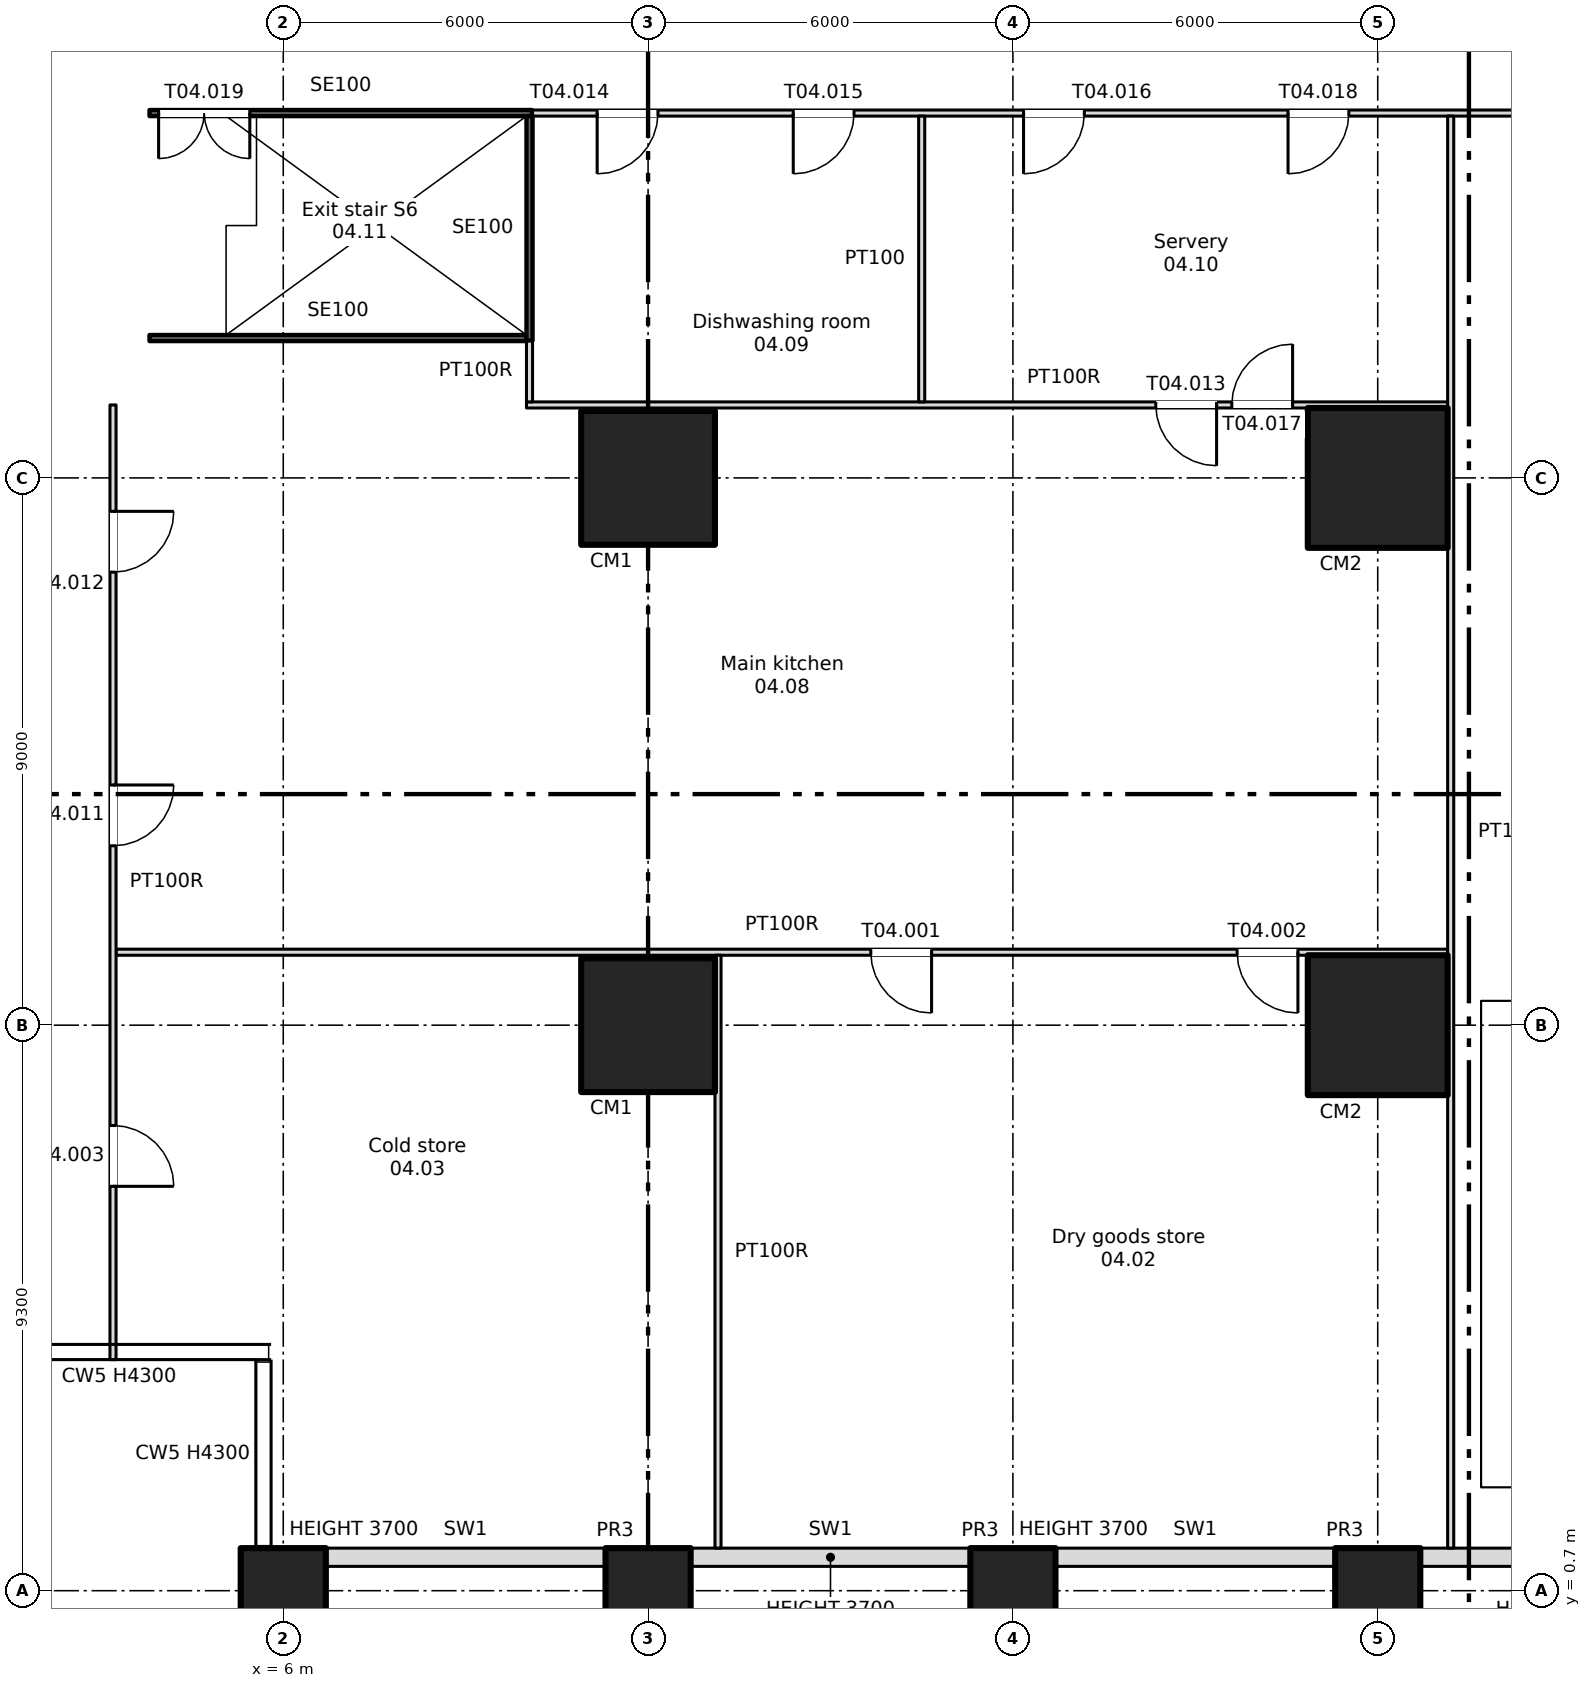
"""IFC4 building model, lengths in metres.
Left out: names, types, materials, properties, quantities, classifications, styles, units other than length and angle.
Written with IfcOpenShell. Run it as: python <this file> out.ifc"""

import sys

from ifc_helpers import new_model, si_unit, direction, frame, frame_2d, origin, origin_2d, place, context, subcontext, project, spatial, rectangle, extrude, element, fill, save


model = new_model("IFC4")
c1 = context("Model", 3, precision=1e-05, world=origin(), true_north=direction((0.0, 1.0)))
c2 = subcontext(c1, "Body", "Model", "MODEL_VIEW")
j1 = project(units=[si_unit("LENGTHUNIT", "METRE"), si_unit("PLANEANGLEUNIT", "RADIAN")], contexts=[c1])
p1 = place(None, origin())
s1 = spatial("IfcSite", under=j1, at=p1, CompositionType="ELEMENT")
p2 = place(p1, origin())
s2 = spatial("IfcBuilding", under=s1, at=p2, CompositionType="ELEMENT")
p3 = place(p2, frame((0.0, 0.0, 6.5)))
s3 = spatial("IfcBuildingStorey", under=s2, at=p3, CompositionType="ELEMENT", Elevation=6.5)
for number, where, z_axis, x_axis in (
    (1, (6.0, 0.7, -1.1), (0.0, 0.0, 1.0), (1.0, 0.0, 0.0)),
    (2, (12.0, 0.7, -1.1), (0.0, 0.0, 1.0), (1.0, 0.0, 0.0)),
    (3, (18.0, 0.7, -1.1), (0.0, 0.0, 1.0), (1.0, 0.0, 0.0)),
    (4, (24.0, 0.7, -1.1), (0.0, 0.0, 1.0), (1.0, 0.0, 0.0)),
):
    element("IfcColumn", number, at=place(p3, frame(where, z_axis=z_axis, x_axis=x_axis)), inside=s3, PredefinedType="COLUMN", context=c2, shape_type="SweptSolid", body=[
        extrude(rectangle(XDim=1.4, YDim=1.4, at=origin_2d()), origin(), (0.0, 0.0, 1.0), 5.4),
    ])
for number, where, z_axis, x_axis in (
    (5, (12.0, 10.0, 0.0), (0.0, 0.0, 1.0), (1.0, 0.0, 0.0)),
    (6, (12.0, 19.0, 0.0), (0.0, 0.0, 1.0), (1.0, 0.0, 0.0)),
):
    element("IfcColumn", number, at=place(p3, frame(where, z_axis=z_axis, x_axis=x_axis)), inside=s3, PredefinedType="COLUMN", context=c2, shape_type="SweptSolid", body=[
        extrude(rectangle(XDim=2.2, YDim=2.2, at=origin_2d()), origin(), (0.0, 0.0, 1.0), 4.3),
    ])
for number, where, z_axis, x_axis in (
    (7, (24.0, 10.0, 0.0), (0.0, 0.0, 1.0), (1.0, 0.0, 0.0)),
    (8, (24.0, 19.0, 0.0), (0.0, 0.0, 1.0), (1.0, 0.0, 0.0)),
):
    element("IfcColumn", number, at=place(p3, frame(where, z_axis=z_axis, x_axis=x_axis)), inside=s3, PredefinedType="COLUMN", context=c2, shape_type="SweptSolid", body=[
        extrude(rectangle(XDim=2.3, YDim=2.3, at=origin_2d()), origin(), (0.0, 0.0, 1.0), 4.3),
    ])
for number, where, z_axis, x_axis in (
    (9, (6.7, 1.25, 0.0), (0.0, 0.0, 1.0), (1.0, 0.0, 0.0)),
    (10, (12.7, 1.25, 0.0), (0.0, 0.0, 1.0), (1.0, 0.0, 0.0)),
    (11, (18.7, 1.25, 0.0), (0.0, 0.0, 1.0), (1.0, 0.0, 0.0)),
):
    element("IfcWall", number, at=place(p3, frame(where, z_axis=z_axis, x_axis=x_axis)), inside=s3, PredefinedType="SOLIDWALL", context=c2, shape_type="SweptSolid", body=[
        extrude(rectangle(XDim=4.6, YDim=0.3, at=frame_2d((2.3, 0.0))), origin(), (0.0, 0.0, 1.0), 3.7),
    ])
p4 = place(p3, frame((24.7, 1.25, 0.0), z_axis=(0.0, 0.0, 1.0), x_axis=(1.0, 0.0, 0.0)))
e12 = element("IfcWall", 12, at=p4, inside=s3, PredefinedType="SOLIDWALL", context=c2, shape_type="SweptSolid", body=[
    extrude(rectangle(XDim=4.6, YDim=0.3, at=frame_2d((2.3, 0.0))), origin(), (0.0, 0.0, 1.0), 3.7),
])
p5 = place(p4, frame((1.55, 0.0, 0.9)))
e13 = element("IfcOpeningElement", 13, at=p5, cuts=e12, PredefinedType="OPENING", context=c2, shape_type="SweptSolid", body=[
    extrude(rectangle(XDim=1.5, YDim=2.4, at=frame_2d((0.75, 1.2))), frame((0.0, 0.16, 0.0), z_axis=(0.0, -1.0, 0.0), x_axis=(1.0, 0.0, 0.0)), (0.0, 0.0, 1.0), 0.32),
])
p6 = place(p3, frame((3.25, 11.2, 0.0), z_axis=(0.0, 0.0, 1.0), x_axis=(1.0, 0.0, 0.0)))
e14 = element("IfcWall", 14, at=p6, inside=s3, PredefinedType="PARTITIONING", context=c2, shape_type="SweptSolid", body=[
    extrude(rectangle(XDim=21.9, YDim=0.1, at=frame_2d((10.95, 0.0))), origin(), (0.0, 0.0, 1.0), 4.3),
])
p7 = place(p6, frame((12.413, 0.0, 0.0)))
e15 = element("IfcOpeningElement", 15, at=p7, cuts=e14, PredefinedType="OPENING", context=c2, shape_type="SweptSolid", body=[
    extrude(rectangle(XDim=1.0, YDim=2.1, at=frame_2d((0.5, 1.05))), frame((0.0, 0.06, 0.0), z_axis=(0.0, -1.0, 0.0), x_axis=(1.0, 0.0, 0.0)), (0.0, 0.0, 1.0), 0.12),
])
p8 = place(p6, frame((18.438, 0.0, 0.0)))
e16 = element("IfcOpeningElement", 16, at=p8, cuts=e14, PredefinedType="OPENING", context=c2, shape_type="SweptSolid", body=[
    extrude(rectangle(XDim=1.0, YDim=2.1, at=frame_2d((0.5, 1.05))), frame((0.0, 0.06, 0.0), z_axis=(0.0, -1.0, 0.0), x_axis=(1.0, 0.0, 0.0)), (0.0, 0.0, 1.0), 0.12),
])
p9 = place(p3, frame((10.0, 20.2, 0.0), z_axis=(0.0, 0.0, 1.0), x_axis=(1.0, 0.0, 0.0)))
e17 = element("IfcWall", 17, at=p9, inside=s3, PredefinedType="PARTITIONING", context=c2, shape_type="SweptSolid", body=[
    extrude(rectangle(XDim=15.15, YDim=0.1, at=frame_2d((7.575, 0.0))), origin(), (0.0, 0.0, 1.0), 4.3),
])
p10 = place(p9, frame((10.35, 0.0, 0.0)))
e18 = element("IfcOpeningElement", 18, at=p10, cuts=e17, PredefinedType="OPENING", context=c2, shape_type="SweptSolid", body=[
    extrude(rectangle(XDim=1.0, YDim=2.1, at=frame_2d((0.5, 1.05))), frame((0.0, 0.06, 0.0), z_axis=(0.0, -1.0, 0.0), x_axis=(1.0, 0.0, 0.0)), (0.0, 0.0, 1.0), 0.12),
])
p11 = place(p9, frame((11.6, 0.0, 0.0)))
e19 = element("IfcOpeningElement", 19, at=p11, cuts=e17, PredefinedType="OPENING", context=c2, shape_type="SweptSolid", body=[
    extrude(rectangle(XDim=1.0, YDim=2.1, at=frame_2d((0.5, 1.05))), frame((0.0, 0.06, 0.0), z_axis=(0.0, -1.0, 0.0), x_axis=(1.0, 0.0, 0.0)), (0.0, 0.0, 1.0), 0.12),
])
p12 = place(p3, frame((3.8, 21.3, 0.0), z_axis=(0.0, 0.0, 1.0), x_axis=(1.0, 0.0, 0.0)))
e20 = element("IfcWall", 20, at=p12, inside=s3, PredefinedType="SOLIDWALL", context=c2, shape_type="SweptSolid", body=[
    extrude(rectangle(XDim=6.2, YDim=0.1, at=frame_2d((3.1, 0.0))), origin(), (0.0, 0.0, 1.0), 4.3),
])
p13 = place(p3, frame((3.8, 25.0, 0.0), z_axis=(0.0, 0.0, 1.0), x_axis=(1.0, 0.0, 0.0)))
e21 = element("IfcWall", 21, at=p13, inside=s3, PredefinedType="SOLIDWALL", context=c2, shape_type="SweptSolid", body=[
    extrude(rectangle(XDim=6.29, YDim=0.1, at=frame_2d((3.145, 0.0))), origin(), (0.0, 0.0, 1.0), 4.3),
])
p14 = place(p13, frame((0.15, 0.0, 0.0)))
e22 = element("IfcOpeningElement", 22, at=p14, cuts=e21, PredefinedType="OPENING", context=c2, shape_type="SweptSolid", body=[
    extrude(rectangle(XDim=1.5, YDim=2.1, at=frame_2d((0.75, 1.05))), frame((0.0, 0.06, 0.0), z_axis=(0.0, -1.0, 0.0), x_axis=(1.0, 0.0, 0.0)), (0.0, 0.0, 1.0), 0.12),
])
p15 = place(p3, frame((10.09, 25.0, 0.0), z_axis=(0.0, 0.0, 1.0), x_axis=(1.0, 0.0, 0.0)))
e23 = element("IfcWall", 23, at=p15, inside=s3, PredefinedType="PARTITIONING", context=c2, shape_type="SweptSolid", body=[
    extrude(rectangle(XDim=51.02, YDim=0.1, at=frame_2d((25.51, 0.0))), origin(), (0.0, 0.0, 1.0), 4.3),
])
p16 = place(p15, frame((20.51, 0.0, 0.0)))
e24 = element("IfcOpeningElement", 24, at=p16, cuts=e23, PredefinedType="OPENING", context=c2, shape_type="SweptSolid", body=[
    extrude(rectangle(XDim=1.2, YDim=2.1, at=frame_2d((0.6, 1.05))), frame((0.0, 0.06, 0.0), z_axis=(0.0, -1.0, 0.0), x_axis=(1.0, 0.0, 0.0)), (0.0, 0.0, 1.0), 0.12),
])
p17 = place(p15, frame((32.51, 0.0, 0.0)))
e25 = element("IfcOpeningElement", 25, at=p17, cuts=e23, PredefinedType="OPENING", context=c2, shape_type="SweptSolid", body=[
    extrude(rectangle(XDim=1.2, YDim=2.1, at=frame_2d((0.6, 1.05))), frame((0.0, 0.06, 0.0), z_axis=(0.0, -1.0, 0.0), x_axis=(1.0, 0.0, 0.0)), (0.0, 0.0, 1.0), 0.12),
])
p18 = place(p15, frame((41.498, 0.0, 0.0)))
e26 = element("IfcOpeningElement", 26, at=p18, cuts=e23, PredefinedType="OPENING", context=c2, shape_type="SweptSolid", body=[
    extrude(rectangle(XDim=1.2, YDim=2.1, at=frame_2d((0.6, 1.05))), frame((0.0, 0.06, 0.0), z_axis=(0.0, -1.0, 0.0), x_axis=(1.0, 0.0, 0.0)), (0.0, 0.0, 1.0), 0.12),
])
p19 = place(p15, frame((47.472, 0.0, 0.0)))
e27 = element("IfcOpeningElement", 27, at=p19, cuts=e23, PredefinedType="OPENING", context=c2, shape_type="SweptSolid", body=[
    extrude(rectangle(XDim=1.2, YDim=2.1, at=frame_2d((0.6, 1.05))), frame((0.0, 0.06, 0.0), z_axis=(0.0, -1.0, 0.0), x_axis=(1.0, 0.0, 0.0)), (0.0, 0.0, 1.0), 0.12),
])
p20 = place(p15, frame((1.073, 0.0, 0.0)))
e28 = element("IfcOpeningElement", 28, at=p20, cuts=e23, PredefinedType="OPENING", context=c2, shape_type="SweptSolid", body=[
    extrude(rectangle(XDim=1.0, YDim=2.1, at=frame_2d((0.5, 1.05))), frame((0.0, 0.06, 0.0), z_axis=(0.0, -1.0, 0.0), x_axis=(1.0, 0.0, 0.0)), (0.0, 0.0, 1.0), 0.12),
])
p21 = place(p15, frame((4.298, 0.0, 0.0)))
e29 = element("IfcOpeningElement", 29, at=p21, cuts=e23, PredefinedType="OPENING", context=c2, shape_type="SweptSolid", body=[
    extrude(rectangle(XDim=1.0, YDim=2.1, at=frame_2d((0.5, 1.05))), frame((0.0, 0.06, 0.0), z_axis=(0.0, -1.0, 0.0), x_axis=(1.0, 0.0, 0.0)), (0.0, 0.0, 1.0), 0.12),
])
p22 = place(p15, frame((8.085, 0.0, 0.0)))
e30 = element("IfcOpeningElement", 30, at=p22, cuts=e23, PredefinedType="OPENING", context=c2, shape_type="SweptSolid", body=[
    extrude(rectangle(XDim=1.0, YDim=2.1, at=frame_2d((0.5, 1.05))), frame((0.0, 0.06, 0.0), z_axis=(0.0, -1.0, 0.0), x_axis=(1.0, 0.0, 0.0)), (0.0, 0.0, 1.0), 0.12),
])
p23 = place(p15, frame((12.435, 0.0, 0.0)))
e31 = element("IfcOpeningElement", 31, at=p23, cuts=e23, PredefinedType="OPENING", context=c2, shape_type="SweptSolid", body=[
    extrude(rectangle(XDim=1.0, YDim=2.1, at=frame_2d((0.5, 1.05))), frame((0.0, 0.06, 0.0), z_axis=(0.0, -1.0, 0.0), x_axis=(1.0, 0.0, 0.0)), (0.0, 0.0, 1.0), 0.12),
])
p24 = place(p3, frame((3.2, 4.5, 0.0), z_axis=(0.0, 0.0, 1.0), x_axis=(0.0, 1.0, 0.0)))
e32 = element("IfcWall", 32, at=p24, inside=s3, PredefinedType="PARTITIONING", context=c2, shape_type="SweptSolid", body=[
    extrude(rectangle(XDim=15.7, YDim=0.1, at=frame_2d((7.85, 0.0))), origin(), (0.0, 0.0, 1.0), 4.3),
])
p25 = place(p24, frame((2.85, 0.0, 0.0)))
e33 = element("IfcOpeningElement", 33, at=p25, cuts=e32, PredefinedType="OPENING", context=c2, shape_type="SweptSolid", body=[
    extrude(rectangle(XDim=1.0, YDim=2.1, at=frame_2d((0.5, 1.05))), frame((0.0, 0.06, 0.0), z_axis=(0.0, -1.0, 0.0), x_axis=(1.0, 0.0, 0.0)), (0.0, 0.0, 1.0), 0.12),
])
p26 = place(p24, frame((8.45, 0.0, 0.0)))
e34 = element("IfcOpeningElement", 34, at=p26, cuts=e32, PredefinedType="OPENING", context=c2, shape_type="SweptSolid", body=[
    extrude(rectangle(XDim=1.0, YDim=2.1, at=frame_2d((0.5, 1.05))), frame((0.0, 0.06, 0.0), z_axis=(0.0, -1.0, 0.0), x_axis=(1.0, 0.0, 0.0)), (0.0, 0.0, 1.0), 0.12),
])
p27 = place(p24, frame((12.95, 0.0, 0.0)))
e35 = element("IfcOpeningElement", 35, at=p27, cuts=e32, PredefinedType="OPENING", context=c2, shape_type="SweptSolid", body=[
    extrude(rectangle(XDim=1.0, YDim=2.1, at=frame_2d((0.5, 1.05))), frame((0.0, 0.06, 0.0), z_axis=(0.0, -1.0, 0.0), x_axis=(1.0, 0.0, 0.0)), (0.0, 0.0, 1.0), 0.12),
])
p28 = place(p3, frame((10.05, 20.25, 0.0), z_axis=(0.0, 0.0, 1.0), x_axis=(0.0, 1.0, 0.0)))
e36 = element("IfcWall", 36, at=p28, inside=s3, PredefinedType="PARTITIONING", context=c2, shape_type="SweptSolid", body=[
    extrude(rectangle(XDim=1.01, YDim=0.1, at=frame_2d((0.505, 0.0))), origin(), (0.0, 0.0, 1.0), 4.3),
])
p29 = place(p3, frame((10.05, 21.26, 0.0), z_axis=(0.0, 0.0, 1.0), x_axis=(0.0, 1.0, 0.0)))
e37 = element("IfcWall", 37, at=p29, inside=s3, PredefinedType="SOLIDWALL", context=c2, shape_type="SweptSolid", body=[
    extrude(rectangle(XDim=3.69, YDim=0.1, at=frame_2d((1.845, 0.0))), origin(), (0.0, 0.0, 1.0), 4.3),
])
p30 = place(p3, frame((13.15, 1.4, 0.0), z_axis=(0.0, 0.0, 1.0), x_axis=(0.0, 1.0, 0.0)))
e38 = element("IfcWall", 38, at=p30, inside=s3, PredefinedType="PARTITIONING", context=c2, shape_type="SweptSolid", body=[
    extrude(rectangle(XDim=9.75, YDim=0.1, at=frame_2d((4.875, 0.0))), origin(), (0.0, 0.0, 1.0), 4.3),
])
p31 = place(p3, frame((16.5, 20.25, 0.0), z_axis=(0.0, 0.0, 1.0), x_axis=(0.0, 1.0, 0.0)))
e39 = element("IfcWall", 39, at=p31, inside=s3, PredefinedType="PARTITIONING", context=c2, shape_type="SweptSolid", body=[
    extrude(rectangle(XDim=4.7, YDim=0.1, at=frame_2d((2.35, 0.0))), origin(), (0.0, 0.0, 1.0), 4.3),
])
p32 = place(p3, frame((25.2, 1.4, 0.0), z_axis=(0.0, 0.0, 1.0), x_axis=(0.0, 1.0, 0.0)))
e40 = element("IfcWall", 40, at=p32, inside=s3, PredefinedType="PARTITIONING", context=c2, shape_type="SweptSolid", body=[
    extrude(rectangle(XDim=23.55, YDim=0.1, at=frame_2d((11.775, 0.0))), origin(), (0.0, 0.0, 1.0), 4.3),
])
p33 = place(p7, origin())
e41 = element("IfcDoor", 41, at=p33, inside=s3, OperationType="SINGLE_SWING_RIGHT", PredefinedType="DOOR", context=c2, shape_type="SweptSolid", body=[
    extrude(rectangle(XDim=1.0, YDim=2.1, at=frame_2d((0.5, 1.05))), frame((0.0, 0.025, 0.0), z_axis=(0.0, -1.0, 0.0), x_axis=(1.0, 0.0, 0.0)), (0.0, 0.0, 1.0), 0.05),
])
fill(e15, e41)
p34 = place(p8, origin())
e42 = element("IfcDoor", 42, at=p34, inside=s3, OperationType="SINGLE_SWING_RIGHT", PredefinedType="DOOR", context=c2, shape_type="SweptSolid", body=[
    extrude(rectangle(XDim=1.0, YDim=2.1, at=frame_2d((0.5, 1.05))), frame((0.0, 0.025, 0.0), z_axis=(0.0, -1.0, 0.0), x_axis=(1.0, 0.0, 0.0)), (0.0, 0.0, 1.0), 0.05),
])
fill(e16, e42)
p35 = place(p25, origin())
e43 = element("IfcDoor", 43, at=p35, inside=s3, OperationType="SINGLE_SWING_LEFT", PredefinedType="DOOR", context=c2, shape_type="SweptSolid", body=[
    extrude(rectangle(XDim=1.0, YDim=2.1, at=frame_2d((0.5, 1.05))), frame((0.0, 0.025, 0.0), z_axis=(0.0, -1.0, 0.0), x_axis=(1.0, 0.0, 0.0)), (0.0, 0.0, 1.0), 0.05),
])
fill(e33, e43)
p36 = place(p26, origin())
e44 = element("IfcDoor", 44, at=p36, inside=s3, OperationType="SINGLE_SWING_RIGHT", PredefinedType="DOOR", context=c2, shape_type="SweptSolid", body=[
    extrude(rectangle(XDim=1.0, YDim=2.1, at=frame_2d((0.5, 1.05))), frame((0.0, 0.025, 0.0), z_axis=(0.0, -1.0, 0.0), x_axis=(1.0, 0.0, 0.0)), (0.0, 0.0, 1.0), 0.05),
])
fill(e34, e44)
p37 = place(p27, origin())
e45 = element("IfcDoor", 45, at=p37, inside=s3, OperationType="SINGLE_SWING_RIGHT", PredefinedType="DOOR", context=c2, shape_type="SweptSolid", body=[
    extrude(rectangle(XDim=1.0, YDim=2.1, at=frame_2d((0.5, 1.05))), frame((0.0, 0.025, 0.0), z_axis=(0.0, -1.0, 0.0), x_axis=(1.0, 0.0, 0.0)), (0.0, 0.0, 1.0), 0.05),
])
fill(e35, e45)
p38 = place(p10, origin())
e46 = element("IfcDoor", 46, at=p38, inside=s3, OperationType="SINGLE_SWING_RIGHT", PredefinedType="DOOR", context=c2, shape_type="SweptSolid", body=[
    extrude(rectangle(XDim=1.0, YDim=2.1, at=frame_2d((0.5, 1.05))), frame((0.0, 0.025, 0.0), z_axis=(0.0, -1.0, 0.0), x_axis=(1.0, 0.0, 0.0)), (0.0, 0.0, 1.0), 0.05),
])
fill(e18, e46)
p39 = place(p20, origin())
e47 = element("IfcDoor", 47, at=p39, inside=s3, OperationType="SINGLE_SWING_LEFT", PredefinedType="DOOR", context=c2, shape_type="SweptSolid", body=[
    extrude(rectangle(XDim=1.0, YDim=2.1, at=frame_2d((0.5, 1.05))), frame((0.0, 0.025, 0.0), z_axis=(0.0, -1.0, 0.0), x_axis=(1.0, 0.0, 0.0)), (0.0, 0.0, 1.0), 0.05),
])
fill(e28, e47)
p40 = place(p21, origin())
e48 = element("IfcDoor", 48, at=p40, inside=s3, OperationType="SINGLE_SWING_LEFT", PredefinedType="DOOR", context=c2, shape_type="SweptSolid", body=[
    extrude(rectangle(XDim=1.0, YDim=2.1, at=frame_2d((0.5, 1.05))), frame((0.0, 0.025, 0.0), z_axis=(0.0, -1.0, 0.0), x_axis=(1.0, 0.0, 0.0)), (0.0, 0.0, 1.0), 0.05),
])
fill(e29, e48)
p41 = place(p22, origin())
e49 = element("IfcDoor", 49, at=p41, inside=s3, OperationType="SINGLE_SWING_LEFT", PredefinedType="DOOR", context=c2, shape_type="SweptSolid", body=[
    extrude(rectangle(XDim=1.0, YDim=2.1, at=frame_2d((0.5, 1.05))), frame((0.0, 0.025, 0.0), z_axis=(0.0, -1.0, 0.0), x_axis=(1.0, 0.0, 0.0)), (0.0, 0.0, 1.0), 0.05),
])
fill(e30, e49)
p42 = place(p11, origin())
e50 = element("IfcDoor", 50, at=p42, inside=s3, OperationType="SINGLE_SWING_RIGHT", PredefinedType="DOOR", context=c2, shape_type="SweptSolid", body=[
    extrude(rectangle(XDim=1.0, YDim=2.1, at=frame_2d((0.5, 1.05))), frame((0.0, 0.025, 0.0), z_axis=(0.0, -1.0, 0.0), x_axis=(1.0, 0.0, 0.0)), (0.0, 0.0, 1.0), 0.05),
])
fill(e19, e50)
p43 = place(p23, origin())
e51 = element("IfcDoor", 51, at=p43, inside=s3, OperationType="SINGLE_SWING_LEFT", PredefinedType="DOOR", context=c2, shape_type="SweptSolid", body=[
    extrude(rectangle(XDim=1.0, YDim=2.1, at=frame_2d((0.5, 1.05))), frame((0.0, 0.025, 0.0), z_axis=(0.0, -1.0, 0.0), x_axis=(1.0, 0.0, 0.0)), (0.0, 0.0, 1.0), 0.05),
])
fill(e31, e51)
p44 = place(p14, origin())
e52 = element("IfcDoor", 52, at=p44, inside=s3, OperationType="DOUBLE_DOOR_SINGLE_SWING", PredefinedType="DOOR", context=c2, shape_type="SweptSolid", body=[
    extrude(rectangle(XDim=1.5, YDim=2.1, at=frame_2d((0.75, 1.05))), frame((0.0, 0.025, 0.0), z_axis=(0.0, -1.0, 0.0), x_axis=(1.0, 0.0, 0.0)), (0.0, 0.0, 1.0), 0.05),
])
fill(e22, e52)
save(model, sys.argv[1])
